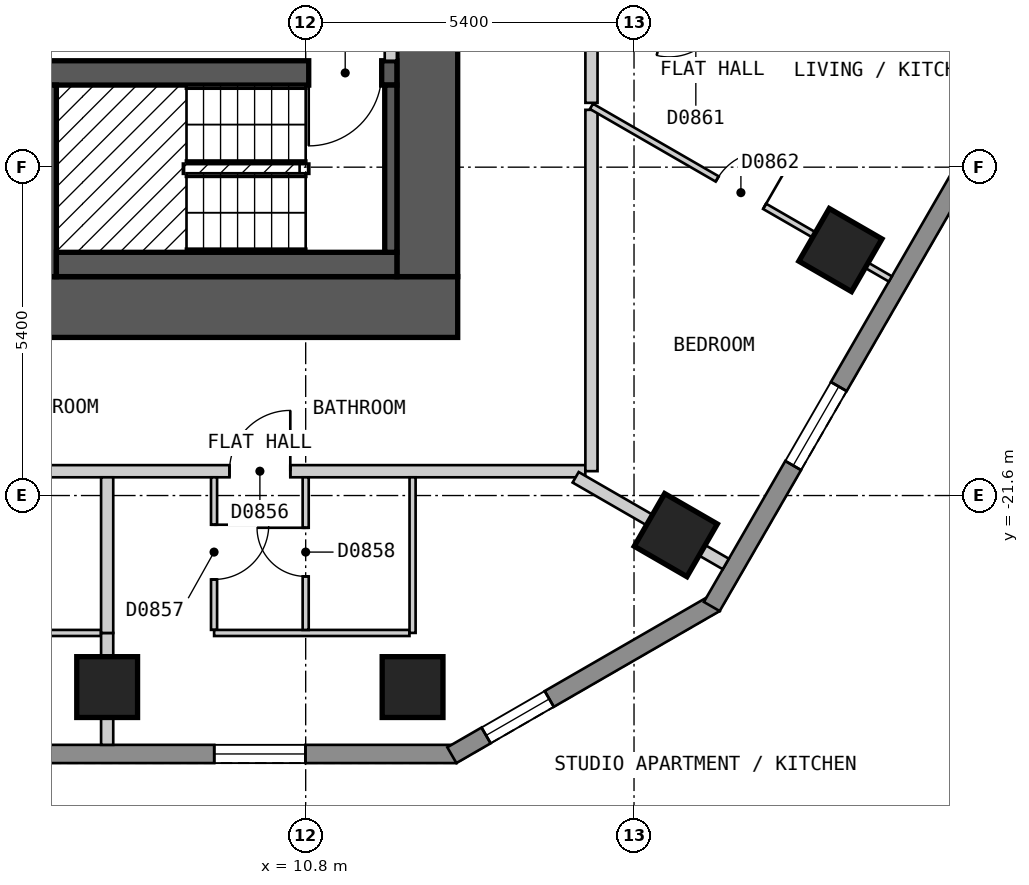
"""IFC4 building model, lengths in metres.
Left out: names, types, materials, properties, quantities, classifications, styles, units other than length and angle.
Written with IfcOpenShell. Run it as: python <this file> out.ifc"""

import sys

from ifc_helpers import new_model, si_unit, direction, frame, frame_2d, origin, origin_2d, place, context, subcontext, project, spatial, polyline, rectangle, outline, extrude, element, fill, save


model = new_model("IFC4")
c1 = context("Model", 3, precision=1e-05, world=origin(), true_north=direction((0.0, 1.0)))
c2 = subcontext(c1, "Body", "Model", "MODEL_VIEW")
j1 = project(units=[si_unit("LENGTHUNIT", "METRE"), si_unit("PLANEANGLEUNIT", "RADIAN")], contexts=[c1])
p1 = place(None, origin())
s1 = spatial("IfcSite", under=j1, at=p1, CompositionType="ELEMENT")
p2 = place(p1, origin())
s2 = spatial("IfcBuilding", under=s1, at=p2, CompositionType="ELEMENT")
p3 = place(p2, frame((0.0, 0.0, 72.0)))
s3 = spatial("IfcBuildingStorey", under=s2, at=p3, CompositionType="ELEMENT", Elevation=72.0)
for number, where, z_axis, x_axis in (
    (1, (7.535, -24.75, 0.0), (0.0, 0.0, 1.0), (1.0, 0.0, 0.0)),
    (2, (12.558, -24.75, 0.0), (0.0, 0.0, 1.0), (1.0, 0.0, 0.0)),
    (3, (16.887, -22.251, 0.0), (0.0, 0.0, 1.0), (0.5, 0.866, 0.0)),
    (4, (19.594, -17.563, 0.0), (0.0, 0.0, 1.0), (0.5, 0.866, 0.0)),
):
    element("IfcColumn", number, at=place(p3, frame(where, z_axis=z_axis, x_axis=x_axis)), inside=s3, PredefinedType="COLUMN", context=c2, shape_type="SweptSolid", body=[
        extrude(rectangle(XDim=1.0, YDim=1.0, at=origin_2d()), origin(), (0.0, 0.0, 1.0), 3.0),
    ])
p4 = place(p3, frame((-13.3, -18.5, 0.0), z_axis=(0.0, 0.0, 1.0), x_axis=(1.0, 0.0, 0.0)))
e5 = element("IfcWall", 5, at=p4, inside=s3, PredefinedType="SHEAR", context=c2, shape_type="SweptSolid", body=[
    extrude(rectangle(XDim=26.6, YDim=1.0, at=frame_2d((13.3, 0.0))), origin(), (0.0, 0.0, 1.0), 2.7),
])
p5 = place(p3, frame((12.8, -18.0, 0.0), z_axis=(0.0, 0.0, 1.0), x_axis=(0.0, 1.0, 0.0)))
e6 = element("IfcWall", 6, at=p5, inside=s3, PredefinedType="SHEAR", context=c2, shape_type="SweptSolid", body=[
    extrude(rectangle(XDim=12.0, YDim=1.0, at=frame_2d((6.0, 0.0))), origin(), (0.0, 0.0, 1.0), 2.7),
])
p6 = place(p3, frame((-12.3, -14.65, 0.0), z_axis=(0.0, 0.0, 1.0), x_axis=(1.0, 0.0, 0.0)))
e7 = element("IfcWall", 7, at=p6, inside=s3, PredefinedType="SHEAR", context=c2, shape_type="SweptSolid", body=[
    extrude(rectangle(XDim=24.6, YDim=0.4, at=frame_2d((12.3, 0.0))), origin(), (0.0, 0.0, 1.0), 2.7),
])
p7 = place(p6, frame((1.5, 0.0, 0.0), z_axis=(0.0, 0.0, 1.0), x_axis=(-1.0, 0.0, 0.0)))
e8 = element("IfcOpeningElement", 8, at=p7, cuts=e7, PredefinedType="OPENING", context=c2, shape_type="SweptSolid", body=[
    extrude(rectangle(XDim=1.2, YDim=2.1, at=frame_2d((0.6, 1.05))), frame((0.0, 0.21, 0.0), z_axis=(0.0, -1.0, 0.0), x_axis=(1.0, 0.0, 0.0)), (0.0, 0.0, 1.0), 0.42),
])
p8 = place(p6, frame((24.35, 0.0, 0.0), z_axis=(0.0, 0.0, 1.0), x_axis=(-1.0, 0.0, 0.0)))
e9 = element("IfcOpeningElement", 9, at=p8, cuts=e7, PredefinedType="OPENING", context=c2, shape_type="SweptSolid", body=[
    extrude(rectangle(XDim=1.2, YDim=2.1, at=frame_2d((0.6, 1.05))), frame((0.0, 0.21, 0.0), z_axis=(0.0, -1.0, 0.0), x_axis=(1.0, 0.0, 0.0)), (0.0, 0.0, 1.0), 0.42),
])
p9 = place(p6, frame((17.4, 0.0, 0.0), z_axis=(0.0, 0.0, 1.0), x_axis=(-1.0, 0.0, 0.0)))
e10 = element("IfcOpeningElement", 10, at=p9, cuts=e7, PredefinedType="OPENING", context=c2, shape_type="SweptSolid", body=[
    extrude(rectangle(XDim=1.0, YDim=2.1, at=frame_2d((0.5, 1.05))), frame((0.0, 0.21, 0.0), z_axis=(0.0, -1.0, 0.0), x_axis=(1.0, 0.0, 0.0)), (0.0, 0.0, 1.0), 0.42),
])
p10 = place(p3, frame((6.5, -18.0, 0.0), z_axis=(0.0, 0.0, 1.0), x_axis=(0.0, 1.0, 0.0)))
e11 = element("IfcWall", 11, at=p10, inside=s3, PredefinedType="SHEAR", context=c2, shape_type="SweptSolid", body=[
    extrude(rectangle(XDim=3.15, YDim=0.4, at=frame_2d((1.575, 0.0))), origin(), (0.0, 0.0, 1.0), 2.7),
])
p11 = place(p3, frame((-13.279, -25.85, 0.0), z_axis=(0.0, 0.0, 1.0), x_axis=(1.0, 0.0, 0.0)))
e12 = element("IfcWall", 12, at=p11, inside=s3, PredefinedType="SOLIDWALL", context=c2, shape_type="SweptSolid", body=[
    extrude(outline(polyline([(0.0, -0.15), (26.558, -0.15), (26.478, 0.15), (0.08, 0.15), (0.0, -0.15)])), origin(), (0.0, 0.0, 1.0), 2.7),
])
p12 = place(p11, frame((2.483, 0.0, 0.15)))
e13 = element("IfcOpeningElement", 13, at=p12, cuts=e12, PredefinedType="OPENING", context=c2, shape_type="SweptSolid", body=[
    extrude(rectangle(XDim=1.5, YDim=2.1, at=frame_2d((0.75, 1.05))), frame((0.0, 0.16, 0.0), z_axis=(0.0, -1.0, 0.0), x_axis=(1.0, 0.0, 0.0)), (0.0, 0.0, 1.0), 0.32),
])
p13 = place(p11, frame((7.507, 0.0, 0.15)))
e14 = element("IfcOpeningElement", 14, at=p13, cuts=e12, PredefinedType="OPENING", context=c2, shape_type="SweptSolid", body=[
    extrude(rectangle(XDim=1.5, YDim=2.1, at=frame_2d((0.75, 1.05))), frame((0.0, 0.16, 0.0), z_axis=(0.0, -1.0, 0.0), x_axis=(1.0, 0.0, 0.0)), (0.0, 0.0, 1.0), 0.32),
])
p14 = place(p11, frame((12.529, 0.0, 0.15)))
e15 = element("IfcOpeningElement", 15, at=p14, cuts=e12, PredefinedType="OPENING", context=c2, shape_type="SweptSolid", body=[
    extrude(rectangle(XDim=1.5, YDim=2.1, at=frame_2d((0.75, 1.05))), frame((0.0, 0.16, 0.0), z_axis=(0.0, -1.0, 0.0), x_axis=(1.0, 0.0, 0.0)), (0.0, 0.0, 1.0), 0.32),
])
p15 = place(p11, frame((17.553, 0.0, 0.15)))
e16 = element("IfcOpeningElement", 16, at=p15, cuts=e12, PredefinedType="OPENING", context=c2, shape_type="SweptSolid", body=[
    extrude(rectangle(XDim=1.5, YDim=2.1, at=frame_2d((0.75, 1.05))), frame((0.0, 0.16, 0.0), z_axis=(0.0, -1.0, 0.0), x_axis=(1.0, 0.0, 0.0)), (0.0, 0.0, 1.0), 0.32),
])
p16 = place(p11, frame((22.575, 0.0, 0.15)))
e17 = element("IfcOpeningElement", 17, at=p16, cuts=e12, PredefinedType="OPENING", context=c2, shape_type="SweptSolid", body=[
    extrude(rectangle(XDim=1.5, YDim=2.1, at=frame_2d((0.75, 1.05))), frame((0.0, 0.16, 0.0), z_axis=(0.0, -1.0, 0.0), x_axis=(1.0, 0.0, 0.0)), (0.0, 0.0, 1.0), 0.32),
])
p17 = place(p3, frame((13.204, -25.87, 0.0), z_axis=(0.0, 0.0, 1.0), x_axis=(0.866010750942, 0.50002537861, 0.0)))
e18 = element("IfcWall", 18, at=p17, inside=s3, PredefinedType="SOLIDWALL", context=c2, shape_type="SweptSolid", body=[
    extrude(outline(polyline([(0.0, -0.15), (5.0, -0.15), (4.919, 0.15), (0.08, 0.15), (0.0, -0.15)])), origin(), (0.0, 0.0, 1.0), 2.7),
])
p18 = place(p17, frame((0.65, 0.0, 0.15)))
e19 = element("IfcOpeningElement", 19, at=p18, cuts=e18, PredefinedType="OPENING", context=c2, shape_type="SweptSolid", body=[
    extrude(rectangle(XDim=1.2, YDim=2.1, at=frame_2d((0.6, 1.05))), frame((0.0, 0.16, 0.0), z_axis=(0.0, -1.0, 0.0), x_axis=(1.0, 0.0, 0.0)), (0.0, 0.0, 1.0), 0.32),
])
p19 = place(p3, frame((17.479, -23.425, 0.0), z_axis=(0.0, 0.0, 1.0), x_axis=(0.500035407905, 0.866004960056, 0.0)))
e20 = element("IfcWall", 20, at=p19, inside=s3, PredefinedType="SOLIDWALL", context=c2, shape_type="SweptSolid", body=[
    extrude(outline(polyline([(0.0, -0.15), (23.094, -0.15), (23.014, 0.15), (0.08, 0.15), (0.0, -0.15)])), origin(), (0.0, 0.0, 1.0), 2.7),
])
p20 = place(p19, frame((2.677, 0.0, 0.15)))
e21 = element("IfcOpeningElement", 21, at=p20, cuts=e20, PredefinedType="OPENING", context=c2, shape_type="SweptSolid", body=[
    extrude(rectangle(XDim=1.5, YDim=2.1, at=frame_2d((0.75, 1.05))), frame((0.0, 0.16, 0.0), z_axis=(0.0, -1.0, 0.0), x_axis=(1.0, 0.0, 0.0)), (0.0, 0.0, 1.0), 0.32),
])
p21 = place(p19, frame((8.091, 0.0, 0.15)))
e22 = element("IfcOpeningElement", 22, at=p21, cuts=e20, PredefinedType="OPENING", context=c2, shape_type="SweptSolid", body=[
    extrude(rectangle(XDim=1.5, YDim=2.1, at=frame_2d((0.75, 1.05))), frame((0.0, 0.16, 0.0), z_axis=(0.0, -1.0, 0.0), x_axis=(1.0, 0.0, 0.0)), (0.0, 0.0, 1.0), 0.32),
])
p22 = place(p19, frame((13.504, 0.0, 0.15)))
e23 = element("IfcOpeningElement", 23, at=p22, cuts=e20, PredefinedType="OPENING", context=c2, shape_type="SweptSolid", body=[
    extrude(rectangle(XDim=1.5, YDim=2.1, at=frame_2d((0.75, 1.05))), frame((0.0, 0.16, 0.0), z_axis=(0.0, -1.0, 0.0), x_axis=(1.0, 0.0, 0.0)), (0.0, 0.0, 1.0), 0.32),
])
p23 = place(p19, frame((18.917, 0.0, 0.15)))
e24 = element("IfcOpeningElement", 24, at=p23, cuts=e20, PredefinedType="OPENING", context=c2, shape_type="SweptSolid", body=[
    extrude(rectangle(XDim=1.5, YDim=2.1, at=frame_2d((0.75, 1.05))), frame((0.0, 0.16, 0.0), z_axis=(0.0, -1.0, 0.0), x_axis=(1.0, 0.0, 0.0)), (0.0, 0.0, 1.0), 0.32),
])
p24 = place(p3, frame((15.5, -13.239, 0.0), z_axis=(0.0, 0.0, 1.0), x_axis=(0.0, -1.0, 0.0)))
e25 = element("IfcWall", 25, at=p24, inside=s3, PredefinedType="PARTITIONING", context=c2, shape_type="SweptSolid", body=[
    extrude(rectangle(XDim=1.903, YDim=0.2, at=frame_2d((0.952, 0.0))), origin(), (0.0, 0.0, 1.0), 2.7),
])
p25 = place(p3, frame((-15.499, -21.2, 0.0), z_axis=(0.0, 0.0, 1.0), x_axis=(1.0, 0.0, 0.0)))
e26 = element("IfcWall", 26, at=p25, inside=s3, PredefinedType="PARTITIONING", context=c2, shape_type="SweptSolid", body=[
    extrude(rectangle(XDim=30.898, YDim=0.2, at=frame_2d((15.449, 0.0))), origin(), (0.0, 0.0, 1.0), 2.7),
])
p26 = place(p25, frame((4.954, 0.0, 0.0)))
e27 = element("IfcOpeningElement", 27, at=p26, cuts=e26, PredefinedType="OPENING", context=c2, shape_type="SweptSolid", body=[
    extrude(rectangle(XDim=1.0, YDim=2.1, at=frame_2d((0.5, 1.05))), frame((0.0, 0.11, 0.0), z_axis=(0.0, -1.0, 0.0), x_axis=(1.0, 0.0, 0.0)), (0.0, 0.0, 1.0), 0.22),
])
p27 = place(p25, frame((20.023, 0.0, 0.0)))
e28 = element("IfcOpeningElement", 28, at=p27, cuts=e26, PredefinedType="OPENING", context=c2, shape_type="SweptSolid", body=[
    extrude(rectangle(XDim=1.0, YDim=2.1, at=frame_2d((0.5, 1.05))), frame((0.0, 0.11, 0.0), z_axis=(0.0, -1.0, 0.0), x_axis=(1.0, 0.0, 0.0)), (0.0, 0.0, 1.0), 0.22),
])
p28 = place(p25, frame((25.046, 0.0, 0.0)))
e29 = element("IfcOpeningElement", 29, at=p28, cuts=e26, PredefinedType="OPENING", context=c2, shape_type="SweptSolid", body=[
    extrude(rectangle(XDim=1.0, YDim=2.1, at=frame_2d((0.5, 1.05))), frame((0.0, 0.11, 0.0), z_axis=(0.0, -1.0, 0.0), x_axis=(1.0, 0.0, 0.0)), (0.0, 0.0, 1.0), 0.22),
])
p29 = place(p3, frame((15.5, -21.199, 0.0), z_axis=(0.0, 0.0, 1.0), x_axis=(0.0, 1.0, 0.0)))
e30 = element("IfcWall", 30, at=p29, inside=s3, PredefinedType="PARTITIONING", context=c2, shape_type="SweptSolid", body=[
    extrude(rectangle(XDim=5.942, YDim=0.2, at=frame_2d((2.971, 0.0))), origin(), (0.0, 0.0, 1.0), 2.7),
])
p30 = place(p3, frame((9.293, -21.3, 0.0), z_axis=(0.0, 0.0, 1.0), x_axis=(0.0, -1.0, 0.0)))
e31 = element("IfcWall", 31, at=p30, inside=s3, PredefinedType="PARTITIONING", context=c2, shape_type="SweptSolid", body=[
    extrude(rectangle(XDim=2.509, YDim=0.1, at=frame_2d((1.254, 0.0))), origin(), (0.0, 0.0, 1.0), 2.7),
])
p31 = place(p30, frame((0.78, 0.0, 0.0)))
e32 = element("IfcOpeningElement", 32, at=p31, cuts=e31, PredefinedType="OPENING", context=c2, shape_type="SweptSolid", body=[
    extrude(rectangle(XDim=0.9, YDim=2.1, at=frame_2d((0.45, 1.05))), frame((0.0, 0.06, 0.0), z_axis=(0.0, -1.0, 0.0), x_axis=(1.0, 0.0, 0.0)), (0.0, 0.0, 1.0), 0.12),
])
p32 = place(p3, frame((15.5, -15.2, 0.0), z_axis=(0.0, 0.0, 1.0), x_axis=(0.866035181374, -0.499983064336, 0.0)))
e33 = element("IfcWall", 33, at=p32, inside=s3, PredefinedType="PARTITIONING", context=c2, shape_type="SweptSolid", body=[
    extrude(rectangle(XDim=5.677, YDim=0.1, at=frame_2d((2.838, 0.0))), origin(), (0.0, 0.0, 1.0), 2.7),
])
p33 = place(p32, frame((2.388, 0.0, 0.0)))
e34 = element("IfcOpeningElement", 34, at=p33, cuts=e33, PredefinedType="OPENING", context=c2, shape_type="SweptSolid", body=[
    extrude(rectangle(XDim=0.9, YDim=2.1, at=frame_2d((0.45, 1.05))), frame((0.0, 0.06, 0.0), z_axis=(0.0, -1.0, 0.0), x_axis=(1.0, 0.0, 0.0)), (0.0, 0.0, 1.0), 0.12),
])
p34 = place(p3, frame((4.271, -23.86, 0.0), z_axis=(0.0, 0.0, 1.0), x_axis=(1.0, 0.0, 0.0)))
e35 = element("IfcWall", 35, at=p34, inside=s3, PredefinedType="PARTITIONING", context=c2, shape_type="SweptSolid", body=[
    extrude(rectangle(XDim=3.164, YDim=0.1, at=frame_2d((1.582, 0.0))), origin(), (0.0, 0.0, 1.0), 2.7),
])
p35 = place(p3, frame((9.294, -23.86, 0.0), z_axis=(0.0, 0.0, 1.0), x_axis=(1.0, 0.0, 0.0)))
e36 = element("IfcWall", 36, at=p35, inside=s3, PredefinedType="PARTITIONING", context=c2, shape_type="SweptSolid", body=[
    extrude(rectangle(XDim=3.213, YDim=0.1, at=frame_2d((1.606, 0.0))), origin(), (0.0, 0.0, 1.0), 2.7),
])
p36 = place(p3, frame((10.8, -23.81, 0.0), z_axis=(0.0, 0.0, 1.0), x_axis=(0.0, 1.0, 0.0)))
e37 = element("IfcWall", 37, at=p36, inside=s3, PredefinedType="PARTITIONING", context=c2, shape_type="SweptSolid", body=[
    extrude(rectangle(XDim=2.51, YDim=0.1, at=frame_2d((1.255, 0.0))), origin(), (0.0, 0.0, 1.0), 2.7),
])
p37 = place(p36, frame((0.88, 0.0, 0.0)))
e38 = element("IfcOpeningElement", 38, at=p37, cuts=e37, PredefinedType="OPENING", context=c2, shape_type="SweptSolid", body=[
    extrude(rectangle(XDim=0.8, YDim=2.1, at=frame_2d((0.4, 1.05))), frame((0.0, 0.06, 0.0), z_axis=(0.0, -1.0, 0.0), x_axis=(1.0, 0.0, 0.0)), (0.0, 0.0, 1.0), 0.12),
])
p38 = place(p3, frame((12.558, -23.859, 0.0), z_axis=(0.0, 0.0, 1.0), x_axis=(0.0, 1.0, 0.0)))
e39 = element("IfcWall", 39, at=p38, inside=s3, PredefinedType="PARTITIONING", context=c2, shape_type="SweptSolid", body=[
    extrude(rectangle(XDim=2.559, YDim=0.1, at=frame_2d((1.279, 0.0))), origin(), (0.0, 0.0, 1.0), 2.7),
])
p39 = place(p3, frame((7.535, -23.86, 0.0), z_axis=(0.0, 0.0, 1.0), x_axis=(0.0, -1.0, 0.0)))
e40 = element("IfcWall", 40, at=p39, inside=s3, PredefinedType="PARTITIONING", context=c2, shape_type="SweptSolid", body=[
    extrude(rectangle(XDim=1.84, YDim=0.2, at=frame_2d((0.92, 0.0))), origin(), (0.0, 0.0, 1.0), 2.7),
])
p40 = place(p3, frame((15.24, -21.3, 0.0), z_axis=(0.0, 0.0, 1.0), x_axis=(0.866090043625, -0.499888023795, 0.0)))
e41 = element("IfcWall", 41, at=p40, inside=s3, PredefinedType="PARTITIONING", context=c2, shape_type="SweptSolid", body=[
    extrude(rectangle(XDim=2.851, YDim=0.2, at=frame_2d((1.425, 0.0))), origin(), (0.0, 0.0, 1.0), 2.7),
])
p41 = place(p3, frame((7.535, -23.86, 0.0), z_axis=(0.0, 0.0, 1.0), x_axis=(0.0, 1.0, 0.0)))
e42 = element("IfcWall", 42, at=p41, inside=s3, PredefinedType="PARTITIONING", context=c2, shape_type="SweptSolid", body=[
    extrude(rectangle(XDim=2.56, YDim=0.2, at=frame_2d((1.28, 0.0))), origin(), (0.0, 0.0, 1.0), 2.7),
])
p42 = place(p3, frame((6.7, -17.8, 0.0), z_axis=(0.0, 0.0, 1.0), x_axis=(1.0, 0.0, 0.0)))
e43 = element("IfcWall", 43, at=p42, inside=s3, PredefinedType="SOLIDWALL", context=c2, shape_type="SweptSolid", body=[
    extrude(rectangle(XDim=5.6, YDim=0.4, at=frame_2d((2.8, 0.0))), origin(), (0.0, 0.0, 1.0), 2.7),
])
p43 = place(p3, frame((12.2, -17.6, 0.0), z_axis=(0.0, 0.0, 1.0), x_axis=(0.0, 1.0, 0.0)))
e44 = element("IfcWall", 44, at=p43, inside=s3, PredefinedType="SOLIDWALL", context=c2, shape_type="SweptSolid", body=[
    extrude(rectangle(XDim=2.75, YDim=0.2, at=frame_2d((1.375, 0.0))), origin(), (0.0, 0.0, 1.0), 2.7),
])
p44 = place(p3, frame((12.2, -14.45, 0.0), z_axis=(0.0, 0.0, 1.0), x_axis=(0.0, 1.0, 0.0)))
e45 = element("IfcWall", 45, at=p44, inside=s3, PredefinedType="PARTITIONING", context=c2, shape_type="SweptSolid", body=[
    extrude(rectangle(XDim=8.25, YDim=0.2, at=frame_2d((4.125, 0.0))), origin(), (0.0, 0.0, 1.0), 2.7),
])
p45 = place(p16, origin())
e46 = element("IfcWindow", 46, at=p45, inside=s3, PartitioningType="SINGLE_PANEL", PredefinedType="WINDOW", context=c2, shape_type="SweptSolid", body=[
    extrude(rectangle(XDim=1.5, YDim=2.1, at=frame_2d((0.75, 1.05))), frame((0.0, 0.03, 0.0), z_axis=(0.0, -1.0, 0.0), x_axis=(1.0, 0.0, 0.0)), (0.0, 0.0, 1.0), 0.06),
])
fill(e17, e46)
p46 = place(p18, origin())
e47 = element("IfcWindow", 47, at=p46, inside=s3, PartitioningType="SINGLE_PANEL", PredefinedType="WINDOW", context=c2, shape_type="SweptSolid", body=[
    extrude(rectangle(XDim=1.2, YDim=2.1, at=frame_2d((0.6, 1.05))), frame((0.0, 0.03, 0.0), z_axis=(0.0, -1.0, 0.0), x_axis=(1.0, 0.0, 0.0)), (0.0, 0.0, 1.0), 0.06),
])
fill(e19, e47)
p47 = place(p20, origin())
e48 = element("IfcWindow", 48, at=p47, inside=s3, PartitioningType="SINGLE_PANEL", PredefinedType="WINDOW", context=c2, shape_type="SweptSolid", body=[
    extrude(rectangle(XDim=1.5, YDim=2.1, at=frame_2d((0.75, 1.05))), frame((0.0, 0.03, 0.0), z_axis=(0.0, -1.0, 0.0), x_axis=(1.0, 0.0, 0.0)), (0.0, 0.0, 1.0), 0.06),
])
fill(e21, e48)
p48 = place(p28, origin())
e49 = element("IfcDoor", 49, at=p48, inside=s3, OperationType="SINGLE_SWING_RIGHT", PredefinedType="DOOR", context=c2, shape_type="SweptSolid", body=[
    extrude(rectangle(XDim=1.0, YDim=2.1, at=frame_2d((0.5, 1.05))), frame((0.0, 0.025, 0.0), z_axis=(0.0, -1.0, 0.0), x_axis=(1.0, 0.0, 0.0)), (0.0, 0.0, 1.0), 0.05),
])
fill(e29, e49)
p49 = place(p31, origin())
e50 = element("IfcDoor", 50, at=p49, inside=s3, OperationType="SINGLE_SWING_LEFT", PredefinedType="DOOR", context=c2, shape_type="SweptSolid", body=[
    extrude(rectangle(XDim=0.9, YDim=2.1, at=frame_2d((0.45, 1.05))), frame((0.0, 0.025, 0.0), z_axis=(0.0, -1.0, 0.0), x_axis=(1.0, 0.0, 0.0)), (0.0, 0.0, 1.0), 0.05),
])
fill(e32, e50)
p50 = place(p37, origin())
e51 = element("IfcDoor", 51, at=p50, inside=s3, OperationType="SINGLE_SWING_RIGHT", PredefinedType="DOOR", context=c2, shape_type="SweptSolid", body=[
    extrude(rectangle(XDim=0.8, YDim=2.1, at=frame_2d((0.4, 1.05))), frame((0.0, 0.025, 0.0), z_axis=(0.0, -1.0, 0.0), x_axis=(1.0, 0.0, 0.0)), (0.0, 0.0, 1.0), 0.05),
])
fill(e38, e51)
p51 = place(p33, origin())
e52 = element("IfcDoor", 52, at=p51, inside=s3, OperationType="SINGLE_SWING_RIGHT", PredefinedType="DOOR", context=c2, shape_type="SweptSolid", body=[
    extrude(rectangle(XDim=0.9, YDim=2.1, at=frame_2d((0.45, 1.05))), frame((0.0, 0.025, 0.0), z_axis=(0.0, -1.0, 0.0), x_axis=(1.0, 0.0, 0.0)), (0.0, 0.0, 1.0), 0.05),
])
fill(e34, e52)
p52 = place(p8, origin())
e53 = element("IfcDoor", 53, at=p52, inside=s3, OperationType="SINGLE_SWING_RIGHT", PredefinedType="DOOR", context=c2, shape_type="SweptSolid", body=[
    extrude(rectangle(XDim=1.2, YDim=2.1, at=frame_2d((0.6, 1.05))), frame((0.0, 0.025, 0.0), z_axis=(0.0, -1.0, 0.0), x_axis=(1.0, 0.0, 0.0)), (0.0, 0.0, 1.0), 0.05),
])
fill(e9, e53)
save(model, sys.argv[1])
